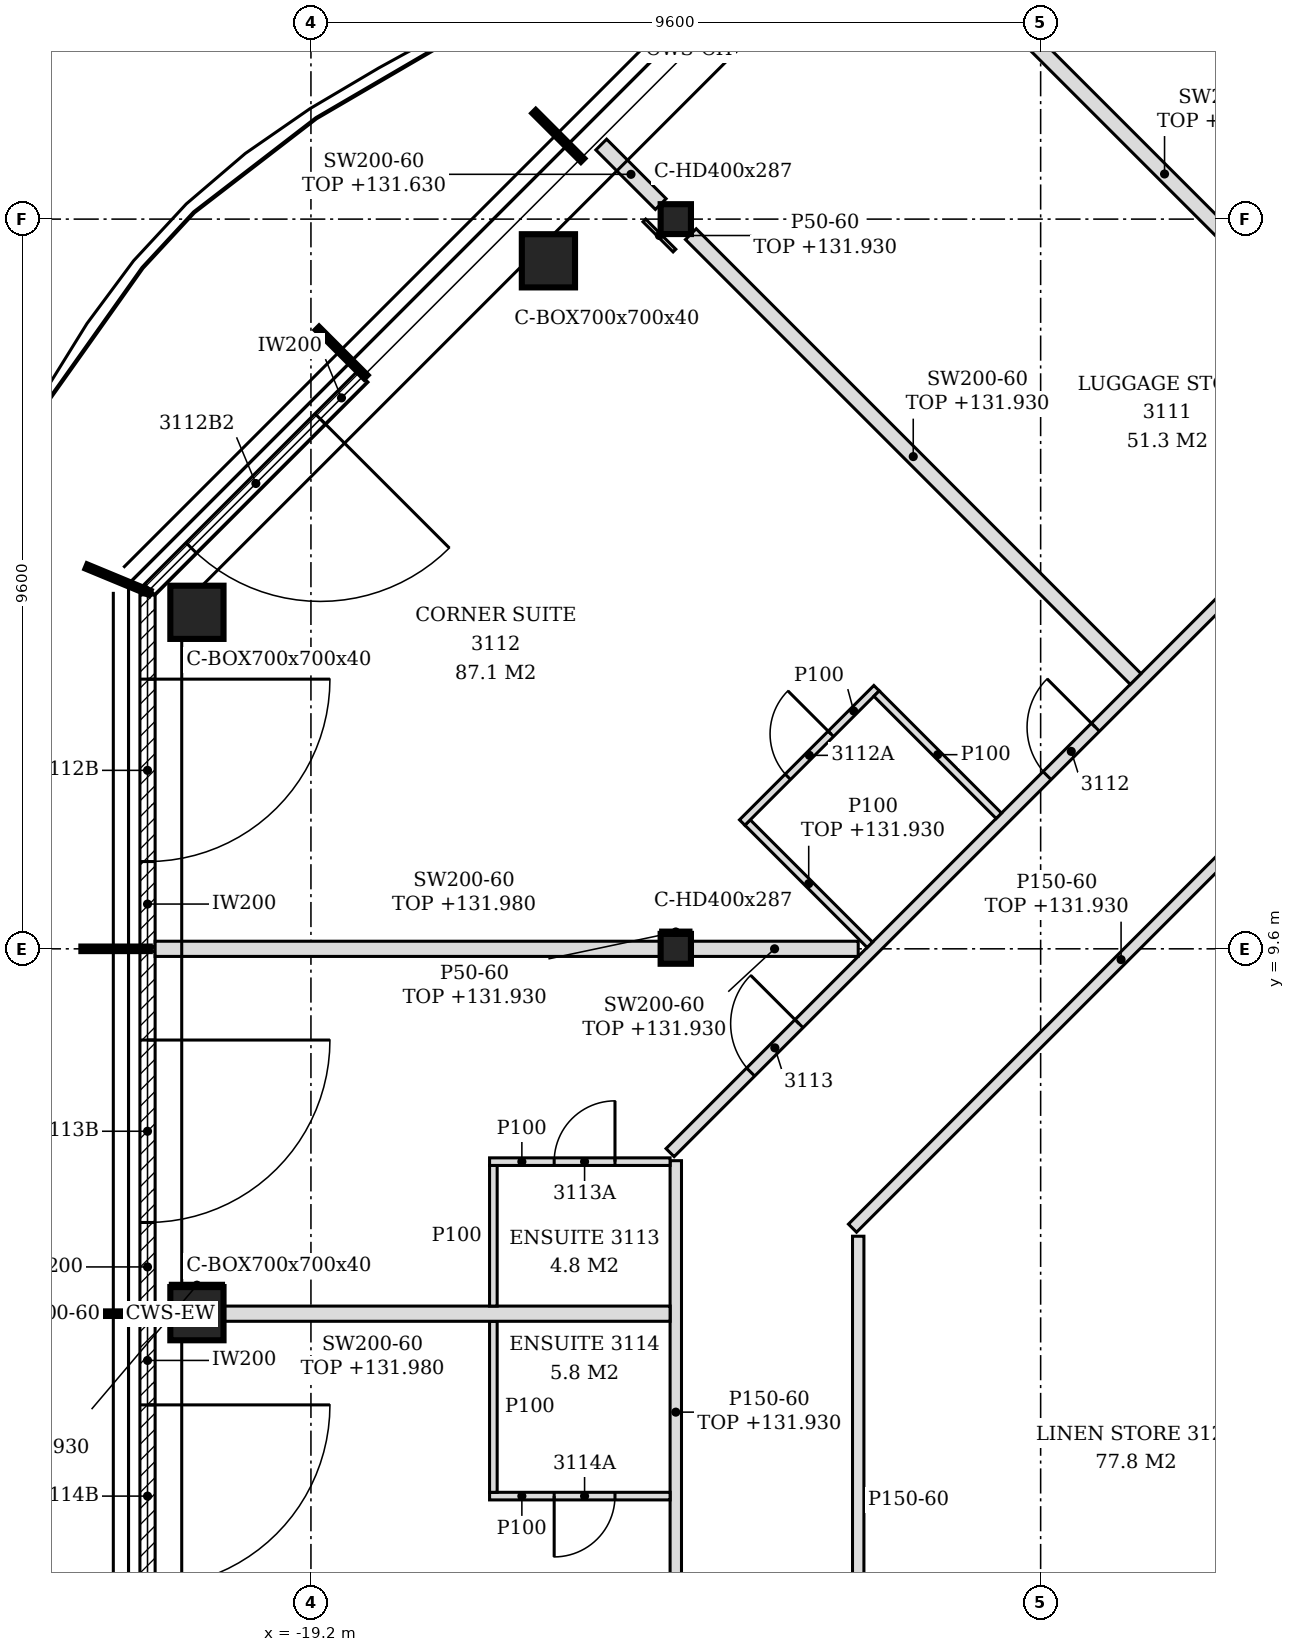
"""IFC4 building model, lengths in metres.
Left out: names, types, materials, properties, quantities, classifications, styles, units other than length and angle.
Written with IfcOpenShell. Run it as: python <this file> out.ifc"""

import sys

from ifc_helpers import new_model, si_unit, direction, frame, frame_2d, origin, origin_2d, place, context, subcontext, project, spatial, polyline, rectangle, hollow_rectangle, i_section, outline, extrude, element, fill, save


model = new_model("IFC4")
c1 = context("Model", 3, precision=1e-05, world=origin(), true_north=direction((0.0, 1.0)))
c2 = subcontext(c1, "Body", "Model", "MODEL_VIEW")
j1 = project(units=[si_unit("LENGTHUNIT", "METRE"), si_unit("PLANEANGLEUNIT", "RADIAN")], contexts=[c1])
p1 = place(None, origin())
s1 = spatial("IfcSite", under=j1, at=p1, CompositionType="ELEMENT")
p2 = place(p1, origin())
s2 = spatial("IfcBuilding", under=s1, at=p2, CompositionType="ELEMENT")
p3 = place(p2, frame((0.0, 0.0, 129.0)))
s3 = spatial("IfcBuildingStorey", under=s2, at=p3, CompositionType="ELEMENT", Elevation=129.0)
for number, where, z_axis, x_axis in (
    (1, (-16.076, 18.652, -0.15), (0.0, 0.0, 1.0), (1.0, 0.0, 0.0)),
    (2, (-20.7, 14.027, -0.15), (0.0, 0.0, 1.0), (1.0, 0.0, 0.0)),
    (3, (-20.7, 4.8, -0.15), (0.0, 0.0, 1.0), (1.0, 0.0, 0.0)),
):
    element("IfcColumn", number, at=place(p3, frame(where, z_axis=z_axis, x_axis=x_axis)), inside=s3, PredefinedType="COLUMN", context=c2, shape_type="SweptSolid", body=[
        extrude(hollow_rectangle(XDim=0.7, YDim=0.7, WallThickness=0.04, at=origin_2d()), origin(), (0.0, 0.0, 1.0), 3.6),
    ])
for number, where, z_axis, x_axis in (
    (4, (-14.4, 9.6, -0.15), (0.0, 0.0, 1.0), (1.0, 0.0, 0.0)),
    (5, (-14.4, 19.2, -0.15), (0.0, 0.0, 1.0), (1.0, 0.0, 0.0)),
):
    element("IfcColumn", number, at=place(p3, frame(where, z_axis=z_axis, x_axis=x_axis)), inside=s3, PredefinedType="COLUMN", context=c2, shape_type="SweptSolid", body=[
        extrude(i_section(OverallWidth=0.399, OverallDepth=0.393, WebThickness=0.023, FlangeThickness=0.037, FilletRadius=0.015, at=origin_2d()), origin(), (0.0, 0.0, 1.0), 3.6),
    ])
p4 = place(p3, frame((-18.521, 17.126, 0.0), z_axis=(0.0, 0.0, 1.0), x_axis=(-0.707106781187, -0.707106781187, 0.0)))
e6 = element("IfcWall", 6, at=p4, inside=s3, PredefinedType="NOTDEFINED", context=c2, shape_type="SweptSolid", body=[
    extrude(rectangle(XDim=3.962, YDim=0.2, at=frame_2d((1.981, 0.0))), origin(), (0.0, 0.0, 1.0), 3.45),
])
p5 = place(p4, frame((0.786, 0.0, 0.0)))
e7 = element("IfcOpeningElement", 7, at=p5, cuts=e6, PredefinedType="OPENING", context=c2, shape_type="SweptSolid", body=[
    extrude(rectangle(XDim=2.4, YDim=2.4, at=frame_2d((1.2, 1.2))), frame((0.0, 0.11, 0.0), z_axis=(0.0, -1.0, 0.0), x_axis=(1.0, 0.0, 0.0)), (0.0, 0.0, 1.0), 0.22),
])
p6 = place(p3, frame((-21.35, 14.256, 0.0), z_axis=(0.0, 0.0, 1.0), x_axis=(0.0, -1.0, 0.0)))
e8 = element("IfcWall", 8, at=p6, inside=s3, PredefinedType="NOTDEFINED", context=c2, shape_type="SweptSolid", body=[
    extrude(rectangle(XDim=4.626, YDim=0.2, at=frame_2d((2.313, 0.0))), origin(), (0.0, 0.0, 1.0), 3.45),
])
p7 = place(p6, frame((1.108, 0.0, 0.0)))
e9 = element("IfcOpeningElement", 9, at=p7, cuts=e8, PredefinedType="OPENING", context=c2, shape_type="SweptSolid", body=[
    extrude(rectangle(XDim=2.4, YDim=2.4, at=frame_2d((1.2, 1.2))), frame((0.0, 0.11, 0.0), z_axis=(0.0, -1.0, 0.0), x_axis=(1.0, 0.0, 0.0)), (0.0, 0.0, 1.0), 0.22),
])
p8 = place(p3, frame((-21.35, 9.57, 0.0), z_axis=(0.0, 0.0, 1.0), x_axis=(0.0, -1.0, 0.0)))
e10 = element("IfcWall", 10, at=p8, inside=s3, PredefinedType="NOTDEFINED", context=c2, shape_type="SweptSolid", body=[
    extrude(rectangle(XDim=4.74, YDim=0.2, at=frame_2d((2.37, 0.0))), origin(), (0.0, 0.0, 1.0), 3.45),
])
p9 = place(p8, frame((1.17, 0.0, 0.0)))
e11 = element("IfcOpeningElement", 11, at=p9, cuts=e10, PredefinedType="OPENING", context=c2, shape_type="SweptSolid", body=[
    extrude(rectangle(XDim=2.4, YDim=2.4, at=frame_2d((1.2, 1.2))), frame((0.0, 0.11, 0.0), z_axis=(0.0, -1.0, 0.0), x_axis=(1.0, 0.0, 0.0)), (0.0, 0.0, 1.0), 0.22),
])
p10 = place(p3, frame((-21.35, 4.77, 0.0), z_axis=(0.0, 0.0, 1.0), x_axis=(0.0, -1.0, 0.0)))
e12 = element("IfcWall", 12, at=p10, inside=s3, PredefinedType="NOTDEFINED", context=c2, shape_type="SweptSolid", body=[
    extrude(rectangle(XDim=4.74, YDim=0.2, at=frame_2d((2.37, 0.0))), origin(), (0.0, 0.0, 1.0), 3.45),
])
p11 = place(p10, frame((1.17, 0.0, 0.0)))
e13 = element("IfcOpeningElement", 13, at=p11, cuts=e12, PredefinedType="OPENING", context=c2, shape_type="SweptSolid", body=[
    extrude(rectangle(XDim=2.4, YDim=2.4, at=frame_2d((1.2, 1.2))), frame((0.0, 0.11, 0.0), z_axis=(0.0, -1.0, 0.0), x_axis=(1.0, 0.0, 0.0)), (0.0, 0.0, 1.0), 0.22),
])
p12 = place(p3, frame((-12.0, -1.125, 0.0), z_axis=(0.0, 0.0, 1.0), x_axis=(0.0, 1.0, 0.0)))
e14 = element("IfcWall", 14, at=p12, inside=s3, PredefinedType="PARTITIONING", context=c2, shape_type="SweptSolid", body=[
    extrude(outline(polyline([(0.0, 0.0), (6.944, 0.0), (6.944, 3.45), (6.025, 3.45), (6.023, 2.93), (5.825, 2.93), (5.823, 3.45), (1.225, 3.45), (1.223, 2.93), (1.025, 2.93), (1.023, 3.45), (0.0, 3.45), (0.0, 0.0)])), frame((0.0, 0.075, 0.0), z_axis=(0.0, -1.0, 0.0), x_axis=(1.0, 0.0, 0.0)), (0.0, 0.0, 1.0), 0.15),
])
p13 = place(p3, frame((-14.4, 0.197, 0.0), z_axis=(0.0, 0.0, 1.0), x_axis=(0.0, 1.0, 0.0)))
e15 = element("IfcWall", 15, at=p13, inside=s3, PredefinedType="PARTITIONING", context=c2, shape_type="SweptSolid", body=[
    extrude(rectangle(XDim=6.616, YDim=0.15, at=frame_2d((3.308, 0.0))), origin(), (0.0, 0.0, 1.0), 2.93),
])
p14 = place(p3, frame((-16.85, 2.4, 0.0), z_axis=(0.0, 0.0, 1.0), x_axis=(1.0, 0.0, 0.0)))
e16 = element("IfcWall", 16, at=p14, inside=s3, PredefinedType="PARTITIONING", context=c2, shape_type="SweptSolid", body=[
    extrude(outline(polyline([(0.0, 0.0), (2.375, 0.0), (2.375, 2.93), (2.3, 2.93), (2.298, 3.45), (0.0, 3.45), (0.0, 0.0)])), frame((0.0, 0.05, 0.0), z_axis=(0.0, -1.0, 0.0), x_axis=(1.0, 0.0, 0.0)), (0.0, 0.0, 1.0), 0.1),
])
p15 = place(p14, frame((0.85, 0.0, 0.0)))
e17 = element("IfcOpeningElement", 17, at=p15, cuts=e16, PredefinedType="OPENING", context=c2, shape_type="SweptSolid", body=[
    extrude(rectangle(XDim=0.8, YDim=2.1, at=frame_2d((0.4, 1.05))), frame((0.0, 0.06, 0.0), z_axis=(0.0, -1.0, 0.0), x_axis=(1.0, 0.0, 0.0)), (0.0, 0.0, 1.0), 0.12),
])
p16 = place(p3, frame((-16.8, 2.45, 0.0), z_axis=(0.0, 0.0, 1.0), x_axis=(0.0, 1.0, 0.0)))
e18 = element("IfcWall", 18, at=p16, inside=s3, PredefinedType="PARTITIONING", context=c2, shape_type="SweptSolid", body=[
    extrude(rectangle(XDim=2.25, YDim=0.1, at=frame_2d((1.125, 0.0))), origin(), (0.0, 0.0, 1.0), 3.45),
])
p17 = place(p3, frame((-21.25, 4.8, 0.0), z_axis=(0.0, 0.0, 1.0), x_axis=(1.0, 0.0, 0.0)))
e19 = element("IfcWall", 19, at=p17, inside=s3, PredefinedType="PARTITIONING", context=c2, shape_type="SweptSolid", body=[
    extrude(rectangle(XDim=0.2, YDim=0.2, at=frame_2d((0.1, 0.0))), origin(), (0.0, 0.0, 1.0), 3.45),
])
p18 = place(p3, frame((-20.35, 4.8, 0.0), z_axis=(0.0, 0.0, 1.0), x_axis=(1.0, 0.0, 0.0)))
e20 = element("IfcWall", 20, at=p18, inside=s3, PredefinedType="PARTITIONING", context=c2, shape_type="SweptSolid", body=[
    extrude(outline(polyline([(0.0, 0.0), (5.875, 0.0), (5.875, 2.93), (5.8, 2.93), (5.798, 2.98), (0.0, 2.98), (0.0, 0.0)])), frame((0.0, 0.1, 0.0), z_axis=(0.0, -1.0, 0.0), x_axis=(1.0, 0.0, 0.0)), (0.0, 0.0, 1.0), 0.2),
])
p19 = place(p3, frame((-16.8, 4.9, 0.0), z_axis=(0.0, 0.0, 1.0), x_axis=(0.0, 1.0, 0.0)))
e21 = element("IfcWall", 21, at=p19, inside=s3, PredefinedType="PARTITIONING", context=c2, shape_type="SweptSolid", body=[
    extrude(rectangle(XDim=1.85, YDim=0.1, at=frame_2d((0.925, 0.0))), origin(), (0.0, 0.0, 1.0), 3.45),
])
p20 = place(p3, frame((-12.075, 5.925, 0.0), z_axis=(0.0, 0.0, 1.0), x_axis=(0.707106781187, 0.707106781187, 0.0)))
e22 = element("IfcWall", 22, at=p20, inside=s3, PredefinedType="PARTITIONING", context=c2, shape_type="SweptSolid", body=[
    extrude(rectangle(XDim=9.993, YDim=0.15, at=frame_2d((4.997, 0.0))), origin(), (0.0, 0.0, 1.0), 2.93),
])
p21 = place(p3, frame((-16.85, 6.8, 0.0), z_axis=(0.0, 0.0, 1.0), x_axis=(1.0, 0.0, 0.0)))
e23 = element("IfcWall", 23, at=p21, inside=s3, PredefinedType="PARTITIONING", context=c2, shape_type="SweptSolid", body=[
    extrude(outline(polyline([(0.0, 0.0), (2.375, 0.0), (2.375, 2.93), (2.3, 2.93), (2.298, 3.45), (0.0, 3.45), (0.0, 0.0)])), frame((0.0, 0.05, 0.0), z_axis=(0.0, -1.0, 0.0), x_axis=(1.0, 0.0, 0.0)), (0.0, 0.0, 1.0), 0.1),
])
p22 = place(p21, frame((0.85, 0.0, 0.0)))
e24 = element("IfcOpeningElement", 24, at=p22, cuts=e23, PredefinedType="OPENING", context=c2, shape_type="SweptSolid", body=[
    extrude(rectangle(XDim=0.8, YDim=2.1, at=frame_2d((0.4, 1.05))), frame((0.0, 0.06, 0.0), z_axis=(0.0, -1.0, 0.0), x_axis=(1.0, 0.0, 0.0)), (0.0, 0.0, 1.0), 0.12),
])
p23 = place(p3, frame((-14.475, 6.919, 0.0), z_axis=(0.0, 0.0, 1.0), x_axis=(0.707106781187, 0.707106781187, 0.0)))
e25 = element("IfcWall", 25, at=p23, inside=s3, PredefinedType="PARTITIONING", context=c2, shape_type="SweptSolid", body=[
    extrude(rectangle(XDim=20.581, YDim=0.15, at=frame_2d((10.291, 0.0))), origin(), (0.0, 0.0, 1.0), 2.73),
])
p24 = place(p23, frame((17.983, 0.0, 0.0)))
e26 = element("IfcOpeningElement", 26, at=p24, cuts=e25, PredefinedType="OPENING", context=c2, shape_type="SweptSolid", body=[
    extrude(rectangle(XDim=0.9, YDim=2.1, at=frame_2d((0.45, 1.05))), frame((0.0, 0.085, 0.0), z_axis=(0.0, -1.0, 0.0), x_axis=(1.0, 0.0, 0.0)), (0.0, 0.0, 1.0), 0.17),
])
p25 = place(p23, frame((10.77, 0.0, 0.0)))
e27 = element("IfcOpeningElement", 27, at=p25, cuts=e25, PredefinedType="OPENING", context=c2, shape_type="SweptSolid", body=[
    extrude(rectangle(XDim=0.9, YDim=2.1, at=frame_2d((0.45, 1.05))), frame((0.0, 0.085, 0.0), z_axis=(0.0, -1.0, 0.0), x_axis=(1.0, 0.0, 0.0)), (0.0, 0.0, 1.0), 0.17),
])
p26 = place(p23, frame((7.014, 0.0, 0.0)))
e28 = element("IfcOpeningElement", 28, at=p26, cuts=e25, PredefinedType="OPENING", context=c2, shape_type="SweptSolid", body=[
    extrude(rectangle(XDim=0.9, YDim=2.1, at=frame_2d((0.45, 1.05))), frame((0.0, 0.085, 0.0), z_axis=(0.0, -1.0, 0.0), x_axis=(1.0, 0.0, 0.0)), (0.0, 0.0, 1.0), 0.17),
])
p27 = place(p23, frame((1.499, 0.0, 0.0)))
e29 = element("IfcOpeningElement", 29, at=p27, cuts=e25, PredefinedType="OPENING", context=c2, shape_type="SweptSolid", body=[
    extrude(rectangle(XDim=0.9, YDim=2.1, at=frame_2d((0.45, 1.05))), frame((0.0, 0.085, 0.0), z_axis=(0.0, -1.0, 0.0), x_axis=(1.0, 0.0, 0.0)), (0.0, 0.0, 1.0), 0.17),
])
p28 = place(p3, frame((-21.25, 9.6, 0.0), z_axis=(0.0, 0.0, 1.0), x_axis=(1.0, 0.0, 0.0)))
e30 = element("IfcWall", 30, at=p28, inside=s3, PredefinedType="PARTITIONING", context=c2, shape_type="SweptSolid", body=[
    extrude(outline(polyline([(0.0, 0.0), (6.65, 0.0), (6.65, 2.98), (0.7, 2.98), (0.698, 2.93), (0.4, 2.93), (0.398, 2.98), (0.0, 2.98), (0.0, 0.0)])), frame((0.0, 0.1, 0.0), z_axis=(0.0, -1.0, 0.0), x_axis=(1.0, 0.0, 0.0)), (0.0, 0.0, 1.0), 0.2),
])
p29 = place(p3, frame((-14.2, 9.6, 0.0), z_axis=(0.0, 0.0, 1.0), x_axis=(1.0, 0.0, 0.0)))
e31 = element("IfcWall", 31, at=p29, inside=s3, PredefinedType="PARTITIONING", context=c2, shape_type="SweptSolid", body=[
    extrude(rectangle(XDim=2.2, YDim=0.2, at=frame_2d((1.1, 0.0))), origin(), (0.0, 0.0, 1.0), 2.93),
])
p30 = place(p3, frame((-11.847, 9.653, 0.0), z_axis=(0.0, 0.0, 1.0), x_axis=(-0.707106781187, 0.707106781187, 0.0)))
e32 = element("IfcWall", 32, at=p30, inside=s3, PredefinedType="PARTITIONING", context=c2, shape_type="SweptSolid", body=[
    extrude(rectangle(XDim=2.275, YDim=0.1, at=frame_2d((1.137, 0.0))), origin(), (0.0, 0.0, 1.0), 2.93),
])
p31 = place(p3, frame((-13.526, 11.262, 0.0), z_axis=(0.0, 0.0, 1.0), x_axis=(0.707106781187, 0.707106781187, 0.0)))
e33 = element("IfcWall", 33, at=p31, inside=s3, PredefinedType="PARTITIONING", context=c2, shape_type="SweptSolid", body=[
    extrude(rectangle(XDim=2.5, YDim=0.1, at=frame_2d((1.25, 0.0))), origin(), (0.0, 0.0, 1.0), 3.45),
])
p32 = place(p31, frame((0.85, 0.0, 0.0)))
e34 = element("IfcOpeningElement", 34, at=p32, cuts=e33, PredefinedType="OPENING", context=c2, shape_type="SweptSolid", body=[
    extrude(rectangle(XDim=0.8, YDim=2.1, at=frame_2d((0.4, 1.05))), frame((0.0, 0.06, 0.0), z_axis=(0.0, -1.0, 0.0), x_axis=(1.0, 0.0, 0.0)), (0.0, 0.0, 1.0), 0.12),
])
p33 = place(p3, frame((-10.15, 11.35, 0.0), z_axis=(0.0, 0.0, 1.0), x_axis=(-0.707160441348, 0.707053116953, 0.0)))
e35 = element("IfcWall", 35, at=p33, inside=s3, PredefinedType="PARTITIONING", context=c2, shape_type="SweptSolid", body=[
    extrude(rectangle(XDim=2.275, YDim=0.1, at=frame_2d((1.137, 0.0))), origin(), (0.0, 0.0, 1.0), 3.45),
])
p34 = place(p3, frame((-8.35, 13.15, 0.0), z_axis=(0.0, 0.0, 1.0), x_axis=(-0.707092030896, 0.707121531169, 0.0)))
e36 = element("IfcWall", 36, at=p34, inside=s3, PredefinedType="PARTITIONING", context=c2, shape_type="SweptSolid", body=[
    extrude(rectangle(XDim=8.276, YDim=0.2, at=frame_2d((4.138, 0.0))), origin(), (0.0, 0.0, 1.0), 2.93),
])
p35 = place(p3, frame((-4.838, 16.662, 0.0), z_axis=(0.0, 0.0, 1.0), x_axis=(-0.707120561855, 0.707093000249, 0.0)))
e37 = element("IfcWall", 37, at=p35, inside=s3, PredefinedType="PARTITIONING", context=c2, shape_type="SweptSolid", body=[
    extrude(rectangle(XDim=8.858, YDim=0.2, at=frame_2d((4.429, 0.0))), origin(), (0.0, 0.0, 1.0), 2.73),
])
p36 = place(p3, frame((-14.598, 19.398, 0.0), z_axis=(0.0, 0.0, 1.0), x_axis=(-0.707106781187, 0.707106781187, 0.0)))
e38 = element("IfcWall", 38, at=p36, inside=s3, PredefinedType="PARTITIONING", context=c2, shape_type="SweptSolid", body=[
    extrude(rectangle(XDim=1.107, YDim=0.2, at=frame_2d((0.554, 0.0))), origin(), (0.0, 0.0, 1.0), 2.63),
])
p37 = place(p3, frame((-21.05, 5.175, 0.0), z_axis=(0.0, 0.0, 1.0), x_axis=(1.0, 0.0, 0.0)))
e39 = element("IfcWall", 39, at=p37, inside=s3, PredefinedType="PARTITIONING", context=c2, shape_type="SweptSolid", body=[
    extrude(rectangle(XDim=0.7, YDim=0.05, at=frame_2d((0.35, 0.0))), origin(), (0.0, 0.0, 1.0), 2.93),
])
p38 = place(p3, frame((-14.6, 9.822, 0.0), z_axis=(0.0, 0.0, 1.0), x_axis=(1.0, 0.0, 0.0)))
e40 = element("IfcWall", 40, at=p38, inside=s3, PredefinedType="PARTITIONING", context=c2, shape_type="SweptSolid", body=[
    extrude(rectangle(XDim=0.399, YDim=0.05, at=frame_2d((0.2, 0.0))), origin(), (0.0, 0.0, 1.0), 2.93),
])
p39 = place(p3, frame((-14.418, 18.786, 0.0), z_axis=(0.0, 0.0, 1.0), x_axis=(-0.707106781187, 0.707106781187, 0.0)))
e41 = element("IfcWall", 41, at=p39, inside=s3, PredefinedType="PARTITIONING", context=c2, shape_type="SweptSolid", body=[
    extrude(rectangle(XDim=0.56, YDim=0.05, at=frame_2d((0.28, 0.0))), origin(), (0.0, 0.0, 1.0), 2.93),
])
p40 = place(p5, origin())
e42 = element("IfcDoor", 42, at=p40, inside=s3, OperationType="SINGLE_SWING_LEFT", PredefinedType="DOOR", context=c2, shape_type="SweptSolid", body=[
    extrude(rectangle(XDim=2.4, YDim=2.4, at=frame_2d((1.2, 1.2))), frame((0.0, 0.025, 0.0), z_axis=(0.0, -1.0, 0.0), x_axis=(1.0, 0.0, 0.0)), (0.0, 0.0, 1.0), 0.05),
])
fill(e7, e42)
p41 = place(p7, origin())
e43 = element("IfcDoor", 43, at=p41, inside=s3, OperationType="SINGLE_SWING_LEFT", PredefinedType="DOOR", context=c2, shape_type="SweptSolid", body=[
    extrude(rectangle(XDim=2.4, YDim=2.4, at=frame_2d((1.2, 1.2))), frame((0.0, 0.025, 0.0), z_axis=(0.0, -1.0, 0.0), x_axis=(1.0, 0.0, 0.0)), (0.0, 0.0, 1.0), 0.05),
])
fill(e9, e43)
p42 = place(p9, origin())
e44 = element("IfcDoor", 44, at=p42, inside=s3, OperationType="SINGLE_SWING_LEFT", PredefinedType="DOOR", context=c2, shape_type="SweptSolid", body=[
    extrude(rectangle(XDim=2.4, YDim=2.4, at=frame_2d((1.2, 1.2))), frame((0.0, 0.025, 0.0), z_axis=(0.0, -1.0, 0.0), x_axis=(1.0, 0.0, 0.0)), (0.0, 0.0, 1.0), 0.05),
])
fill(e11, e44)
p43 = place(p11, origin())
e45 = element("IfcDoor", 45, at=p43, inside=s3, OperationType="SINGLE_SWING_LEFT", PredefinedType="DOOR", context=c2, shape_type="SweptSolid", body=[
    extrude(rectangle(XDim=2.4, YDim=2.4, at=frame_2d((1.2, 1.2))), frame((0.0, 0.025, 0.0), z_axis=(0.0, -1.0, 0.0), x_axis=(1.0, 0.0, 0.0)), (0.0, 0.0, 1.0), 0.05),
])
fill(e13, e45)
p44 = place(p26, origin())
e46 = element("IfcDoor", 46, at=p44, inside=s3, OperationType="SINGLE_SWING_RIGHT", PredefinedType="DOOR", context=c2, shape_type="SweptSolid", body=[
    extrude(rectangle(XDim=0.9, YDim=2.1, at=frame_2d((0.45, 1.05))), frame((0.0, 0.025, 0.0), z_axis=(0.0, -1.0, 0.0), x_axis=(1.0, 0.0, 0.0)), (0.0, 0.0, 1.0), 0.05),
])
fill(e28, e46)
p45 = place(p32, origin())
e47 = element("IfcDoor", 47, at=p45, inside=s3, OperationType="SINGLE_SWING_RIGHT", PredefinedType="DOOR", context=c2, shape_type="SweptSolid", body=[
    extrude(rectangle(XDim=0.8, YDim=2.1, at=frame_2d((0.4, 1.05))), frame((0.0, 0.025, 0.0), z_axis=(0.0, -1.0, 0.0), x_axis=(1.0, 0.0, 0.0)), (0.0, 0.0, 1.0), 0.05),
])
fill(e34, e47)
p46 = place(p27, origin())
e48 = element("IfcDoor", 48, at=p46, inside=s3, OperationType="SINGLE_SWING_RIGHT", PredefinedType="DOOR", context=c2, shape_type="SweptSolid", body=[
    extrude(rectangle(XDim=0.9, YDim=2.1, at=frame_2d((0.45, 1.05))), frame((0.0, 0.025, 0.0), z_axis=(0.0, -1.0, 0.0), x_axis=(1.0, 0.0, 0.0)), (0.0, 0.0, 1.0), 0.05),
])
fill(e29, e48)
p47 = place(p22, origin())
e49 = element("IfcDoor", 49, at=p47, inside=s3, OperationType="SINGLE_SWING_RIGHT", PredefinedType="DOOR", context=c2, shape_type="SweptSolid", body=[
    extrude(rectangle(XDim=0.8, YDim=2.1, at=frame_2d((0.4, 1.05))), frame((0.0, 0.025, 0.0), z_axis=(0.0, -1.0, 0.0), x_axis=(1.0, 0.0, 0.0)), (0.0, 0.0, 1.0), 0.05),
])
fill(e24, e49)
p48 = place(p15, frame((0.8, 0.0, 0.0), z_axis=(0.0, 0.0, 1.0), x_axis=(-1.0, 0.0, 0.0)))
e50 = element("IfcDoor", 50, at=p48, inside=s3, OperationType="SINGLE_SWING_RIGHT", PredefinedType="DOOR", context=c2, shape_type="SweptSolid", body=[
    extrude(rectangle(XDim=0.8, YDim=2.1, at=frame_2d((0.4, 1.05))), frame((0.0, 0.025, 0.0), z_axis=(0.0, -1.0, 0.0), x_axis=(1.0, 0.0, 0.0)), (0.0, 0.0, 1.0), 0.05),
])
fill(e17, e50)
save(model, sys.argv[1])
